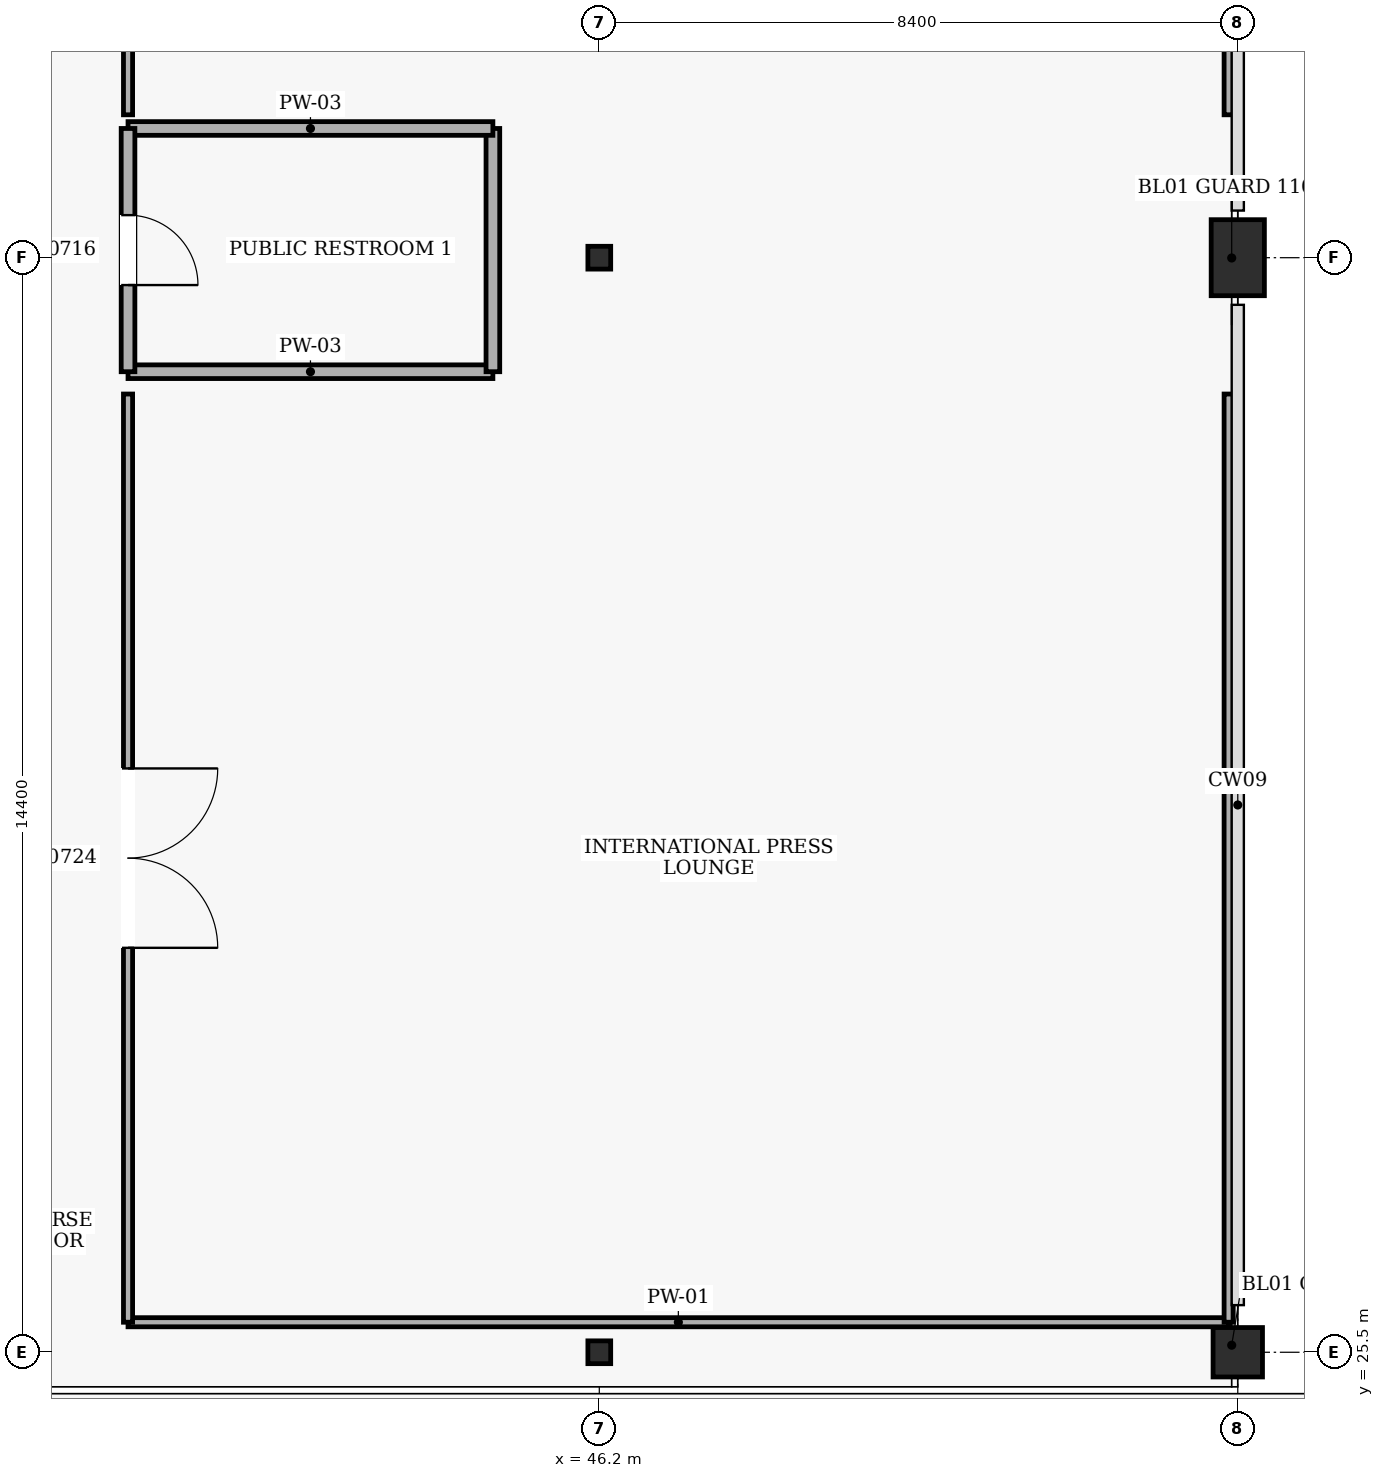
"""IFC4 building model, lengths in metres.
Left out: names, types, materials, properties, quantities, classifications, styles, units other than length and angle.
Written with IfcOpenShell. Run it as: python <this file> out.ifc"""

import sys

from ifc_helpers import new_model, si_unit, direction, frame, frame_2d, origin, origin_2d, place, context, subcontext, project, spatial, rectangle, hollow_rectangle, extrude, element, fill, save


model = new_model("IFC4")
c1 = context("Model", 3, precision=1e-05, world=origin(), true_north=direction((0.0, 1.0)))
c2 = subcontext(c1, "Body", "Model", "MODEL_VIEW")
j1 = project(units=[si_unit("LENGTHUNIT", "METRE"), si_unit("PLANEANGLEUNIT", "RADIAN")], contexts=[c1])
p1 = place(None, origin())
s1 = spatial("IfcSite", under=j1, at=p1, CompositionType="ELEMENT")
p2 = place(p1, origin())
s2 = spatial("IfcBuilding", under=s1, at=p2, CompositionType="ELEMENT")
p3 = place(p2, frame((0.0, 0.0, 19.8)))
s3 = spatial("IfcBuildingStorey", under=s2, at=p3, CompositionType="ELEMENT", Elevation=19.8)
for number, where, z_axis, x_axis in (
    (1, (46.2, 25.5, 0.0), (0.0, 0.0, 1.0), (1.0, 0.0, 0.0)),
    (2, (46.2, 39.9, 0.0), (0.0, 0.0, 1.0), (1.0, 0.0, 0.0)),
):
    element("IfcColumn", number, at=place(p3, frame(where, z_axis=z_axis, x_axis=x_axis)), inside=s3, PredefinedType="COLUMN", context=c2, shape_type="SweptSolid", body=[
        extrude(hollow_rectangle(XDim=0.3, YDim=0.3, WallThickness=0.016, at=origin_2d()), origin(), (0.0, 0.0, 1.0), 4.8),
    ])
p4 = place(p3, frame((54.6, 25.5, 0.0), z_axis=(0.0, 0.0, 1.0), x_axis=(1.0, 0.0, 0.0)))
e3 = element("IfcColumn", 3, at=p4, inside=s3, PredefinedType="COLUMN", context=c2, shape_type="SweptSolid", body=[
    extrude(rectangle(XDim=0.65, YDim=0.65, at=origin_2d()), origin(), (0.0, 0.0, 1.0), 4.8),
])
p5 = place(p3, frame((54.6, 39.9, 0.0), z_axis=(0.0, 0.0, 1.0), x_axis=(1.0, 0.0, 0.0)))
e4 = element("IfcColumn", 4, at=p5, inside=s3, PredefinedType="COLUMN", context=c2, shape_type="SweptSolid", body=[
    extrude(rectangle(XDim=0.7, YDim=1.0, at=origin_2d()), origin(), (0.0, 0.0, 1.0), 4.8),
])
p6 = place(p3, frame((40.0, 38.4, 0.0), z_axis=(0.0, 0.0, 1.0), x_axis=(1.0, 0.0, 0.0)))
e5 = element("IfcWall", 5, at=p6, inside=s3, PredefinedType="PARTITIONING", context=c2, shape_type="SweptSolid", body=[
    extrude(rectangle(XDim=4.8, YDim=0.18, at=frame_2d((2.4, 0.0))), origin(), (0.0, 0.0, 1.0), 4.5),
])
p7 = place(p3, frame((44.8, 38.4, 0.0), z_axis=(0.0, 0.0, 1.0), x_axis=(0.0, 1.0, 0.0)))
e6 = element("IfcWall", 6, at=p7, inside=s3, PredefinedType="PARTITIONING", context=c2, shape_type="SweptSolid", body=[
    extrude(rectangle(XDim=3.2, YDim=0.18, at=frame_2d((1.6, 0.0))), origin(), (0.0, 0.0, 1.0), 4.5),
])
p8 = place(p3, frame((44.8, 41.6, 0.0), z_axis=(0.0, 0.0, 1.0), x_axis=(-1.0, 0.0, 0.0)))
e7 = element("IfcWall", 7, at=p8, inside=s3, PredefinedType="PARTITIONING", context=c2, shape_type="SweptSolid", body=[
    extrude(rectangle(XDim=4.8, YDim=0.18, at=frame_2d((2.4, 0.0))), origin(), (0.0, 0.0, 1.0), 4.5),
])
p9 = place(p3, frame((40.0, 41.6, 0.0), z_axis=(0.0, 0.0, 1.0), x_axis=(0.0, -1.0, 0.0)))
e8 = element("IfcWall", 8, at=p9, inside=s3, PredefinedType="PARTITIONING", context=c2, shape_type="SweptSolid", body=[
    extrude(rectangle(XDim=3.2, YDim=0.18, at=frame_2d((1.6, 0.0))), origin(), (0.0, 0.0, 1.0), 4.5),
])
p10 = place(p9, frame((1.14, 0.0, 0.0)))
e9 = element("IfcOpeningElement", 9, at=p10, cuts=e8, PredefinedType="OPENING", context=c2, shape_type="SweptSolid", body=[
    extrude(rectangle(XDim=0.92, YDim=2.1, at=frame_2d((0.46, 1.05))), frame((0.0, 0.1, 0.0), z_axis=(0.0, -1.0, 0.0), x_axis=(1.0, 0.0, 0.0)), (0.0, 0.0, 1.0), 0.2),
])
p11 = place(p3, frame((40.0, 25.895, 0.0), z_axis=(0.0, 0.0, 1.0), x_axis=(1.0, 0.0, 0.0)))
e10 = element("IfcWall", 10, at=p11, inside=s3, PredefinedType="PARTITIONING", context=c2, shape_type="SweptSolid", body=[
    extrude(rectangle(XDim=14.48, YDim=0.12, at=frame_2d((7.24, 0.0))), origin(), (0.0, 0.0, 1.0), 3.58),
])
p12 = place(p3, frame((54.48, 25.895, 0.0), z_axis=(0.0, 0.0, 1.0), x_axis=(0.0, 1.0, 0.0)))
e11 = element("IfcWall", 11, at=p12, inside=s3, PredefinedType="PARTITIONING", context=c2, shape_type="SweptSolid", body=[
    extrude(rectangle(XDim=12.211, YDim=0.12, at=frame_2d((6.106, 0.0))), origin(), (0.0, 0.0, 1.0), 4.5),
])
p13 = place(p3, frame((40.0, 38.106, 0.0), z_axis=(0.0, 0.0, 1.0), x_axis=(0.0, -1.0, 0.0)))
e12 = element("IfcWall", 12, at=p13, inside=s3, PredefinedType="PARTITIONING", context=c2, shape_type="SweptSolid", body=[
    extrude(rectangle(XDim=12.211, YDim=0.12, at=frame_2d((6.106, 0.0))), origin(), (0.0, 0.0, 1.0), 4.5),
])
p14 = place(p13, frame((4.926, 0.0, 0.0)))
e13 = element("IfcOpeningElement", 13, at=p14, cuts=e12, PredefinedType="OPENING", context=c2, shape_type="SweptSolid", body=[
    extrude(rectangle(XDim=2.36, YDim=2.4, at=frame_2d((1.18, 1.2))), frame((0.0, 0.07, 0.0), z_axis=(0.0, -1.0, 0.0), x_axis=(1.0, 0.0, 0.0)), (0.0, 0.0, 1.0), 0.14),
])
p15 = place(p3, frame((54.48, 41.78, 0.0), z_axis=(0.0, 0.0, 1.0), x_axis=(0.0, 1.0, 0.0)))
e14 = element("IfcWall", 14, at=p15, inside=s3, PredefinedType="PARTITIONING", context=c2, shape_type="SweptSolid", body=[
    extrude(rectangle(XDim=10.74, YDim=0.12, at=frame_2d((5.37, 0.0))), origin(), (0.0, 0.0, 1.0), 4.5),
])
p16 = place(p3, frame((40.0, 52.52, 0.0), z_axis=(0.0, 0.0, 1.0), x_axis=(0.0, -1.0, 0.0)))
e15 = element("IfcWall", 15, at=p16, inside=s3, PredefinedType="PARTITIONING", context=c2, shape_type="SweptSolid", body=[
    extrude(rectangle(XDim=10.74, YDim=0.12, at=frame_2d((5.37, 0.0))), origin(), (0.0, 0.0, 1.0), 4.5),
])
p17 = place(p16, frame((4.91, 0.0, 0.0)))
e16 = element("IfcOpeningElement", 16, at=p17, cuts=e15, PredefinedType="OPENING", context=c2, shape_type="SweptSolid", body=[
    extrude(rectangle(XDim=0.92, YDim=2.1, at=frame_2d((0.46, 1.05))), frame((0.0, 0.07, 0.0), z_axis=(0.0, -1.0, 0.0), x_axis=(1.0, 0.0, 0.0)), (0.0, 0.0, 1.0), 0.14),
])
p18 = place(p10, origin())
e17 = element("IfcDoor", 17, at=p18, inside=s3, OperationType="SINGLE_SWING_RIGHT", PredefinedType="DOOR", context=c2, shape_type="SweptSolid", body=[
    extrude(rectangle(XDim=0.92, YDim=2.1, at=frame_2d((0.46, 1.05))), frame((0.0, 0.025, 0.0), z_axis=(0.0, -1.0, 0.0), x_axis=(1.0, 0.0, 0.0)), (0.0, 0.0, 1.0), 0.05),
])
fill(e9, e17)
p19 = place(p14, origin())
e18 = element("IfcDoor", 18, at=p19, inside=s3, OperationType="DOUBLE_DOOR_SINGLE_SWING", PredefinedType="DOOR", context=c2, shape_type="SweptSolid", body=[
    extrude(rectangle(XDim=2.36, YDim=2.4, at=frame_2d((1.18, 1.2))), frame((0.0, 0.025, 0.0), z_axis=(0.0, -1.0, 0.0), x_axis=(1.0, 0.0, 0.0)), (0.0, 0.0, 1.0), 0.05),
])
fill(e13, e18)
save(model, sys.argv[1])
